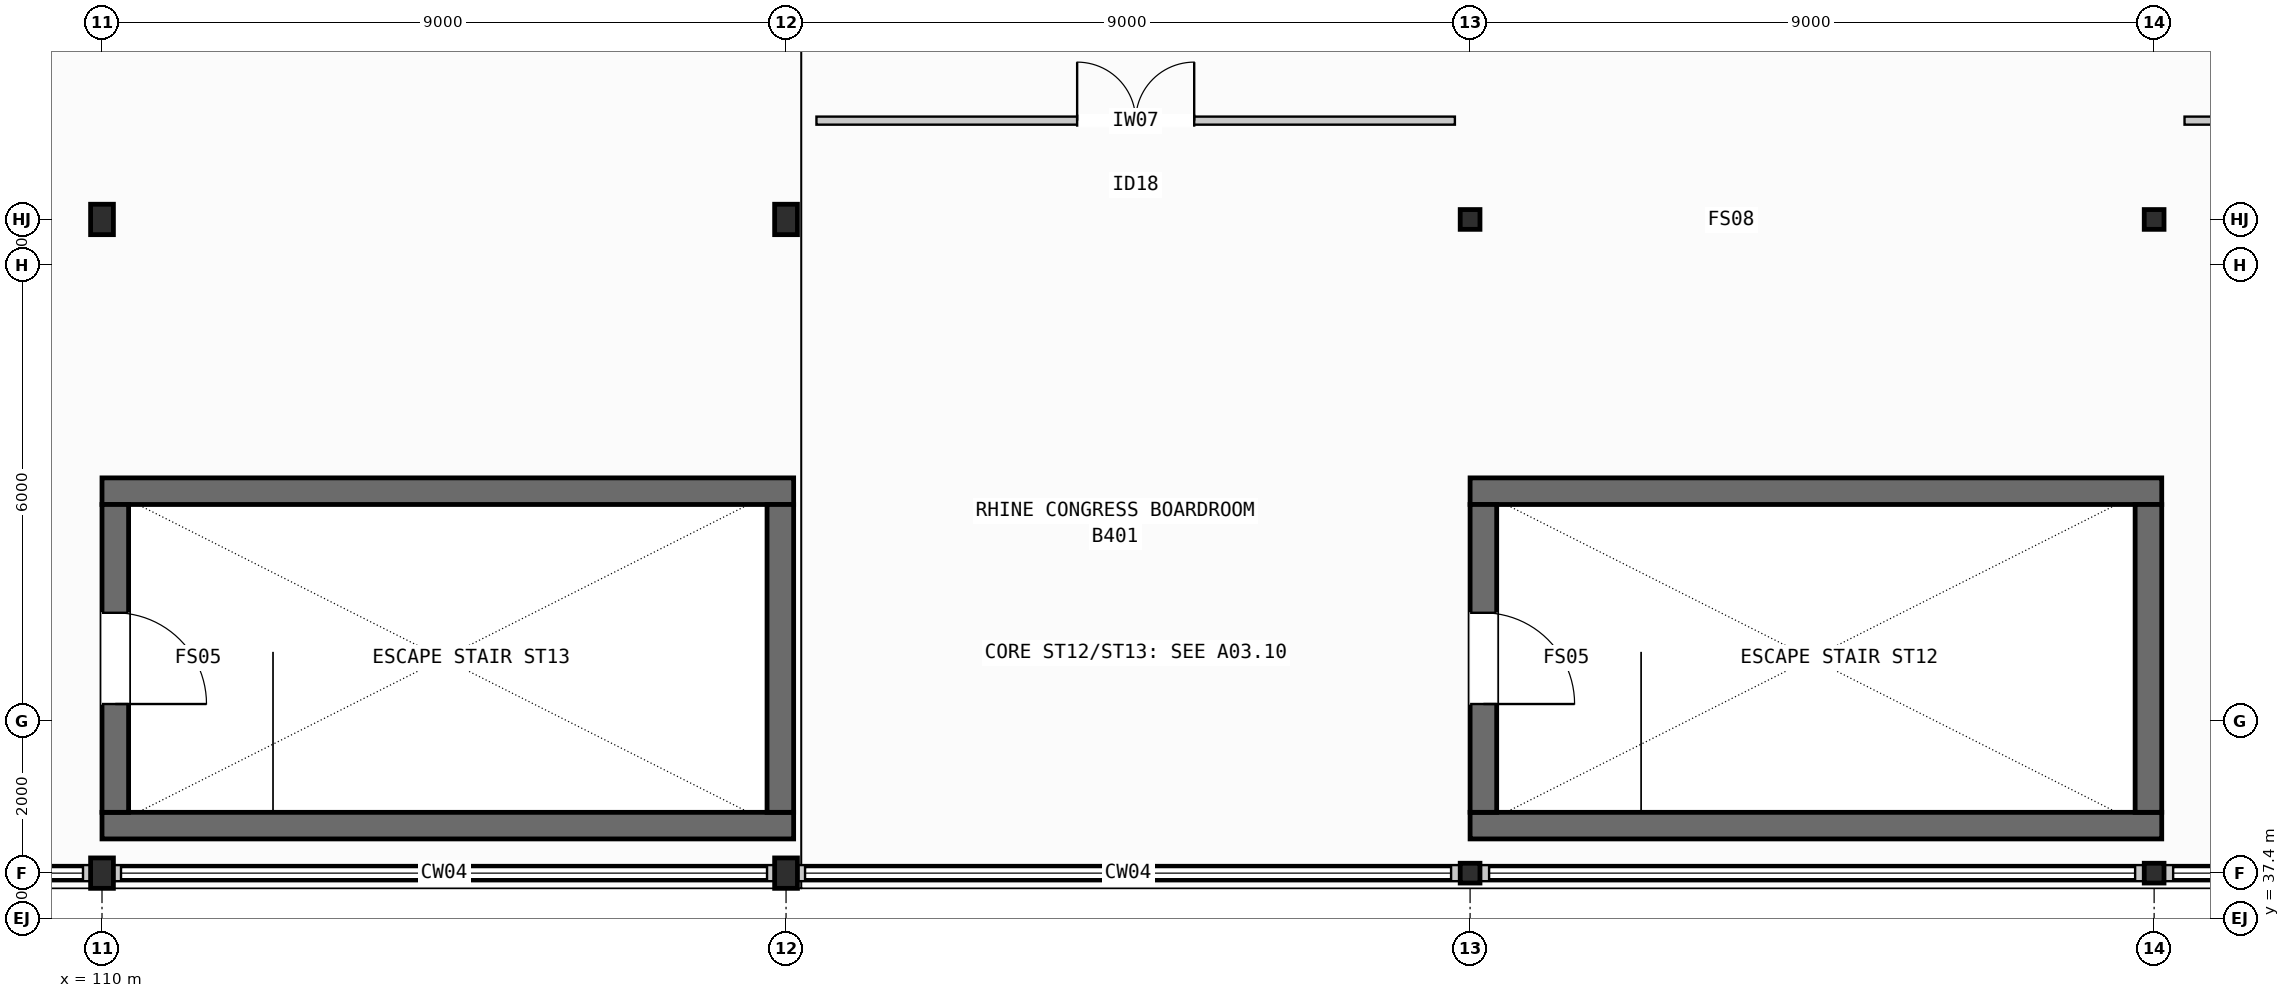
"""IFC4 building model, lengths in metres.
Left out: names, types, materials, properties, quantities, classifications, styles, units other than length and angle.
Written with IfcOpenShell. Run it as: python <this file> out.ifc"""

import sys

from ifc_helpers import new_model, si_unit, direction, frame, frame_2d, origin, origin_2d, place, context, subcontext, project, spatial, rectangle, i_section, extrude, element, fill, save


model = new_model("IFC4")
c1 = context("Model", 3, precision=1e-05, world=origin(), true_north=direction((0.0, 1.0)))
c2 = subcontext(c1, "Body", "Model", "MODEL_VIEW")
j1 = project(units=[si_unit("LENGTHUNIT", "METRE"), si_unit("PLANEANGLEUNIT", "RADIAN")], contexts=[c1])
p1 = place(None, origin())
s1 = spatial("IfcSite", under=j1, at=p1, CompositionType="ELEMENT")
p2 = place(p1, origin())
s2 = spatial("IfcBuilding", under=s1, at=p2, CompositionType="ELEMENT")
p3 = place(p2, frame((0.0, 0.0, 21.6)))
s3 = spatial("IfcBuildingStorey", under=s2, at=p3, CompositionType="ELEMENT", Elevation=21.6)
for number, where, z_axis, x_axis in (
    (1, (110.0, 38.0, 0.0), (0.0, 0.0, 1.0), (1.0, 0.0, 0.0)),
    (2, (110.0, 46.6, 0.0), (0.0, 0.0, 1.0), (1.0, 0.0, 0.0)),
    (3, (119.0, 38.0, 0.0), (0.0, 0.0, 1.0), (1.0, 0.0, 0.0)),
    (4, (119.0, 46.6, 0.0), (0.0, 0.0, 1.0), (1.0, 0.0, 0.0)),
):
    element("IfcColumn", number, at=place(p3, frame(where, z_axis=z_axis, x_axis=x_axis)), inside=s3, PredefinedType="COLUMN", context=c2, shape_type="SweptSolid", body=[
        extrude(i_section(OverallWidth=0.3, OverallDepth=0.4, WebThickness=0.013, FlangeThickness=0.024, FilletRadius=0.027, at=origin_2d()), origin(), (0.0, 0.0, 1.0), 4.8),
    ])
for number, where, z_axis, x_axis in (
    (5, (128.0, 38.0, 0.0), (0.0, 0.0, 1.0), (1.0, 0.0, 0.0)),
    (6, (128.0, 46.6, 0.0), (0.0, 0.0, 1.0), (1.0, 0.0, 0.0)),
    (7, (137.0, 38.0, 0.0), (0.0, 0.0, 1.0), (1.0, 0.0, 0.0)),
    (8, (137.0, 46.6, 0.0), (0.0, 0.0, 1.0), (1.0, 0.0, 0.0)),
):
    element("IfcColumn", number, at=place(p3, frame(where, z_axis=z_axis, x_axis=x_axis)), inside=s3, PredefinedType="COLUMN", context=c2, shape_type="SweptSolid", body=[
        extrude(i_section(OverallWidth=0.26, OverallDepth=0.26, WebThickness=0.01, FlangeThickness=0.018, FilletRadius=0.024, at=origin_2d()), origin(), (0.0, 0.0, 1.0), 4.8),
    ])
for number, where, z_axis, x_axis in (
    (9, (128.0, 38.625, 0.0), (0.0, 0.0, 1.0), (1.0, 0.0, 0.0)),
    (10, (128.0, 43.025, 0.0), (0.0, 0.0, 1.0), (1.0, 0.0, 0.0)),
):
    element("IfcWall", number, at=place(p3, frame(where, z_axis=z_axis, x_axis=x_axis)), inside=s3, PredefinedType="SHEAR", context=c2, shape_type="SweptSolid", body=[
        extrude(rectangle(XDim=9.1, YDim=0.35, at=frame_2d((4.55, 0.0))), origin(), (0.0, 0.0, 1.0), 4.2),
    ])
p4 = place(p3, frame((128.175, 38.8, 0.0), z_axis=(0.0, 0.0, 1.0), x_axis=(0.0, 1.0, 0.0)))
e11 = element("IfcWall", 11, at=p4, inside=s3, PredefinedType="SHEAR", context=c2, shape_type="SweptSolid", body=[
    extrude(rectangle(XDim=4.05, YDim=0.35, at=frame_2d((2.025, 0.0))), origin(), (0.0, 0.0, 1.0), 4.2),
])
p5 = place(p4, frame((1.425, 0.0, 0.0)))
e12 = element("IfcOpeningElement", 12, at=p5, cuts=e11, PredefinedType="OPENING", context=c2, shape_type="SweptSolid", body=[
    extrude(rectangle(XDim=1.2, YDim=2.2, at=frame_2d((0.6, 1.1))), frame((0.0, 0.185, 0.0), z_axis=(0.0, -1.0, 0.0), x_axis=(1.0, 0.0, 0.0)), (0.0, 0.0, 1.0), 0.37),
])
p6 = place(p3, frame((136.925, 38.8, 0.0), z_axis=(0.0, 0.0, 1.0), x_axis=(0.0, 1.0, 0.0)))
e13 = element("IfcWall", 13, at=p6, inside=s3, PredefinedType="SHEAR", context=c2, shape_type="SweptSolid", body=[
    extrude(rectangle(XDim=4.05, YDim=0.35, at=frame_2d((2.025, 0.0))), origin(), (0.0, 0.0, 1.0), 4.2),
])
for number, where, z_axis, x_axis in (
    (14, (110.0, 38.625, 0.0), (0.0, 0.0, 1.0), (1.0, 0.0, 0.0)),
    (15, (110.0, 43.025, 0.0), (0.0, 0.0, 1.0), (1.0, 0.0, 0.0)),
):
    element("IfcWall", number, at=place(p3, frame(where, z_axis=z_axis, x_axis=x_axis)), inside=s3, PredefinedType="SHEAR", context=c2, shape_type="SweptSolid", body=[
        extrude(rectangle(XDim=9.1, YDim=0.35, at=frame_2d((4.55, 0.0))), origin(), (0.0, 0.0, 1.0), 4.2),
    ])
p7 = place(p3, frame((110.175, 38.8, 0.0), z_axis=(0.0, 0.0, 1.0), x_axis=(0.0, 1.0, 0.0)))
e16 = element("IfcWall", 16, at=p7, inside=s3, PredefinedType="SHEAR", context=c2, shape_type="SweptSolid", body=[
    extrude(rectangle(XDim=4.05, YDim=0.35, at=frame_2d((2.025, 0.0))), origin(), (0.0, 0.0, 1.0), 4.2),
])
p8 = place(p7, frame((1.425, 0.0, 0.0)))
e17 = element("IfcOpeningElement", 17, at=p8, cuts=e16, PredefinedType="OPENING", context=c2, shape_type="SweptSolid", body=[
    extrude(rectangle(XDim=1.2, YDim=2.2, at=frame_2d((0.6, 1.1))), frame((0.0, 0.185, 0.0), z_axis=(0.0, -1.0, 0.0), x_axis=(1.0, 0.0, 0.0)), (0.0, 0.0, 1.0), 0.37),
])
p9 = place(p3, frame((118.925, 38.8, 0.0), z_axis=(0.0, 0.0, 1.0), x_axis=(0.0, 1.0, 0.0)))
e18 = element("IfcWall", 18, at=p9, inside=s3, PredefinedType="SHEAR", context=c2, shape_type="SweptSolid", body=[
    extrude(rectangle(XDim=4.05, YDim=0.35, at=frame_2d((2.025, 0.0))), origin(), (0.0, 0.0, 1.0), 4.2),
])
p10 = place(p3, frame((92.0, 38.0, 4.8), z_axis=(0.0, 0.0, 1.0), x_axis=(1.0, 0.0, 0.0)))
e19 = element("IfcWall", 19, at=p10, inside=s3, PredefinedType="PARAPET", context=c2, shape_type="SweptSolid", body=[
    extrude(rectangle(XDim=54.4, YDim=0.212, at=frame_2d((27.2, 0.0))), origin(), (0.0, 0.0, 1.0), 0.95),
])
p11 = place(p3, frame((119.4, 47.9, 0.0), z_axis=(0.0, 0.0, 1.0), x_axis=(1.0, 0.0, 0.0)))
e20 = element("IfcWall", 20, at=p11, inside=s3, PredefinedType="PARTITIONING", context=c2, shape_type="SweptSolid", body=[
    extrude(rectangle(XDim=8.4, YDim=0.106, at=frame_2d((4.2, 0.0))), origin(), (0.0, 0.0, 1.0), 4.0),
])
p12 = place(p11, frame((3.43, 0.0, 0.0)))
e21 = element("IfcOpeningElement", 21, at=p12, cuts=e20, PredefinedType="OPENING", context=c2, shape_type="SweptSolid", body=[
    extrude(rectangle(XDim=1.54, YDim=2.24, at=frame_2d((0.77, 1.12))), frame((0.0, 0.063, 0.0), z_axis=(0.0, -1.0, 0.0), x_axis=(1.0, 0.0, 0.0)), (0.0, 0.0, 1.0), 0.126),
])
p13 = place(p3, frame((137.4, 47.9, 0.0), z_axis=(0.0, 0.0, 1.0), x_axis=(1.0, 0.0, 0.0)))
e22 = element("IfcWall", 22, at=p13, inside=s3, PredefinedType="PARTITIONING", context=c2, shape_type="SweptSolid", body=[
    extrude(rectangle(XDim=8.0, YDim=0.106, at=frame_2d((4.0, 0.0))), origin(), (0.0, 0.0, 1.0), 4.0),
])
p14 = place(p13, frame((3.47, 0.0, 0.0)))
e23 = element("IfcOpeningElement", 23, at=p14, cuts=e22, PredefinedType="OPENING", context=c2, shape_type="SweptSolid", body=[
    extrude(rectangle(XDim=1.06, YDim=2.18, at=frame_2d((0.53, 1.09))), frame((0.0, 0.063, 0.0), z_axis=(0.0, -1.0, 0.0), x_axis=(1.0, 0.0, 0.0)), (0.0, 0.0, 1.0), 0.126),
])
p15 = place(p5, frame((1.2, 0.0, 0.0), z_axis=(0.0, 0.0, 1.0), x_axis=(-1.0, 0.0, 0.0)))
e24 = element("IfcDoor", 24, at=p15, inside=s3, OperationType="SINGLE_SWING_RIGHT", PredefinedType="DOOR", context=c2, shape_type="SweptSolid", body=[
    extrude(rectangle(XDim=1.2, YDim=2.2, at=frame_2d((0.6, 1.1))), frame((0.0, 0.025, 0.0), z_axis=(0.0, -1.0, 0.0), x_axis=(1.0, 0.0, 0.0)), (0.0, 0.0, 1.0), 0.05),
])
fill(e12, e24)
p16 = place(p8, frame((1.2, 0.0, 0.0), z_axis=(0.0, 0.0, 1.0), x_axis=(-1.0, 0.0, 0.0)))
e25 = element("IfcDoor", 25, at=p16, inside=s3, OperationType="SINGLE_SWING_RIGHT", PredefinedType="DOOR", context=c2, shape_type="SweptSolid", body=[
    extrude(rectangle(XDim=1.2, YDim=2.2, at=frame_2d((0.6, 1.1))), frame((0.0, 0.025, 0.0), z_axis=(0.0, -1.0, 0.0), x_axis=(1.0, 0.0, 0.0)), (0.0, 0.0, 1.0), 0.05),
])
fill(e17, e25)
p17 = place(p12, origin())
e26 = element("IfcDoor", 26, at=p17, inside=s3, OperationType="DOUBLE_DOOR_SINGLE_SWING", PredefinedType="DOOR", context=c2, shape_type="SweptSolid", body=[
    extrude(rectangle(XDim=1.54, YDim=2.24, at=frame_2d((0.77, 1.12))), frame((0.0, 0.025, 0.0), z_axis=(0.0, -1.0, 0.0), x_axis=(1.0, 0.0, 0.0)), (0.0, 0.0, 1.0), 0.05),
])
fill(e21, e26)
save(model, sys.argv[1])
